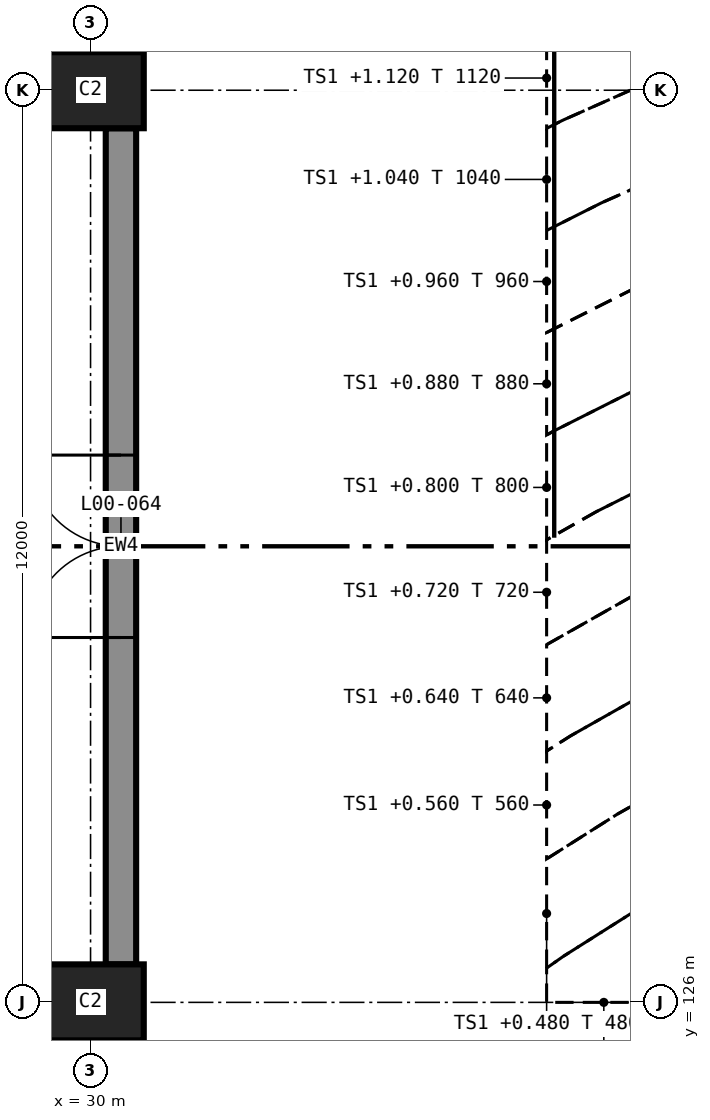
"""IFC4 building model, lengths in metres.
Left out: names, types, materials, properties, quantities, classifications, styles, units other than length and angle.
Written with IfcOpenShell. Run it as: python <this file> out.ifc"""

import sys

from ifc_helpers import new_model, si_unit, direction, frame, frame_2d, origin, origin_2d, place, context, subcontext, project, spatial, rectangle, extrude, element, fill, save


model = new_model("IFC4")
c1 = context("Model", 3, precision=1e-05, world=origin(), true_north=direction((0.0, 1.0)))
c2 = subcontext(c1, "Body", "Model", "MODEL_VIEW")
j1 = project(units=[si_unit("LENGTHUNIT", "METRE"), si_unit("PLANEANGLEUNIT", "RADIAN")], contexts=[c1])
p1 = place(None, origin())
s1 = spatial("IfcSite", under=j1, at=p1, CompositionType="ELEMENT")
p2 = place(p1, origin())
s2 = spatial("IfcBuilding", under=s1, at=p2, CompositionType="ELEMENT")
p3 = place(p2, origin())
s3 = spatial("IfcBuildingStorey", under=s2, at=p3, CompositionType="ELEMENT", Elevation=0.0)
for number, where, z_axis, x_axis in (
    (1, (30.0, 126.0, 0.0), (0.0, 0.0, 1.0), (1.0, 0.0, 0.0)),
    (2, (30.0, 138.0, 0.0), (0.0, 0.0, 1.0), (1.0, 0.0, 0.0)),
):
    element("IfcColumn", number, at=place(p3, frame(where, z_axis=z_axis, x_axis=x_axis)), inside=s3, PredefinedType="COLUMN", context=c2, shape_type="SweptSolid", body=[
        extrude(rectangle(XDim=1.4, YDim=1.0, at=origin_2d()), origin(), (0.0, 0.0, 1.0), 6.0),
    ])
p4 = place(p3, frame((30.4, 126.5, 0.0), z_axis=(0.0, 0.0, 1.0), x_axis=(0.0, 1.0, 0.0)))
e3 = element("IfcWall", 3, at=p4, inside=s3, PredefinedType="SOLIDWALL", context=c2, shape_type="SweptSolid", body=[
    extrude(rectangle(XDim=11.0, YDim=0.4, at=frame_2d((5.5, 0.0))), origin(), (0.0, 0.0, 1.0), 6.0),
])
p5 = place(p4, frame((4.3, 0.0, 0.0)))
e4 = element("IfcOpeningElement", 4, at=p5, cuts=e3, PredefinedType="OPENING", context=c2, shape_type="SweptSolid", body=[
    extrude(rectangle(XDim=2.4, YDim=2.4, at=frame_2d((1.2, 1.2))), frame((0.0, 0.21, 0.0), z_axis=(0.0, -1.0, 0.0), x_axis=(1.0, 0.0, 0.0)), (0.0, 0.0, 1.0), 0.42),
])
p6 = place(p5, origin())
e5 = element("IfcDoor", 5, at=p6, inside=s3, OperationType="DOUBLE_DOOR_SINGLE_SWING", PredefinedType="DOOR", context=c2, shape_type="SweptSolid", body=[
    extrude(rectangle(XDim=2.4, YDim=2.4, at=frame_2d((1.2, 1.2))), frame((0.0, 0.025, 0.0), z_axis=(0.0, -1.0, 0.0), x_axis=(1.0, 0.0, 0.0)), (0.0, 0.0, 1.0), 0.05),
])
fill(e4, e5)
save(model, sys.argv[1])
